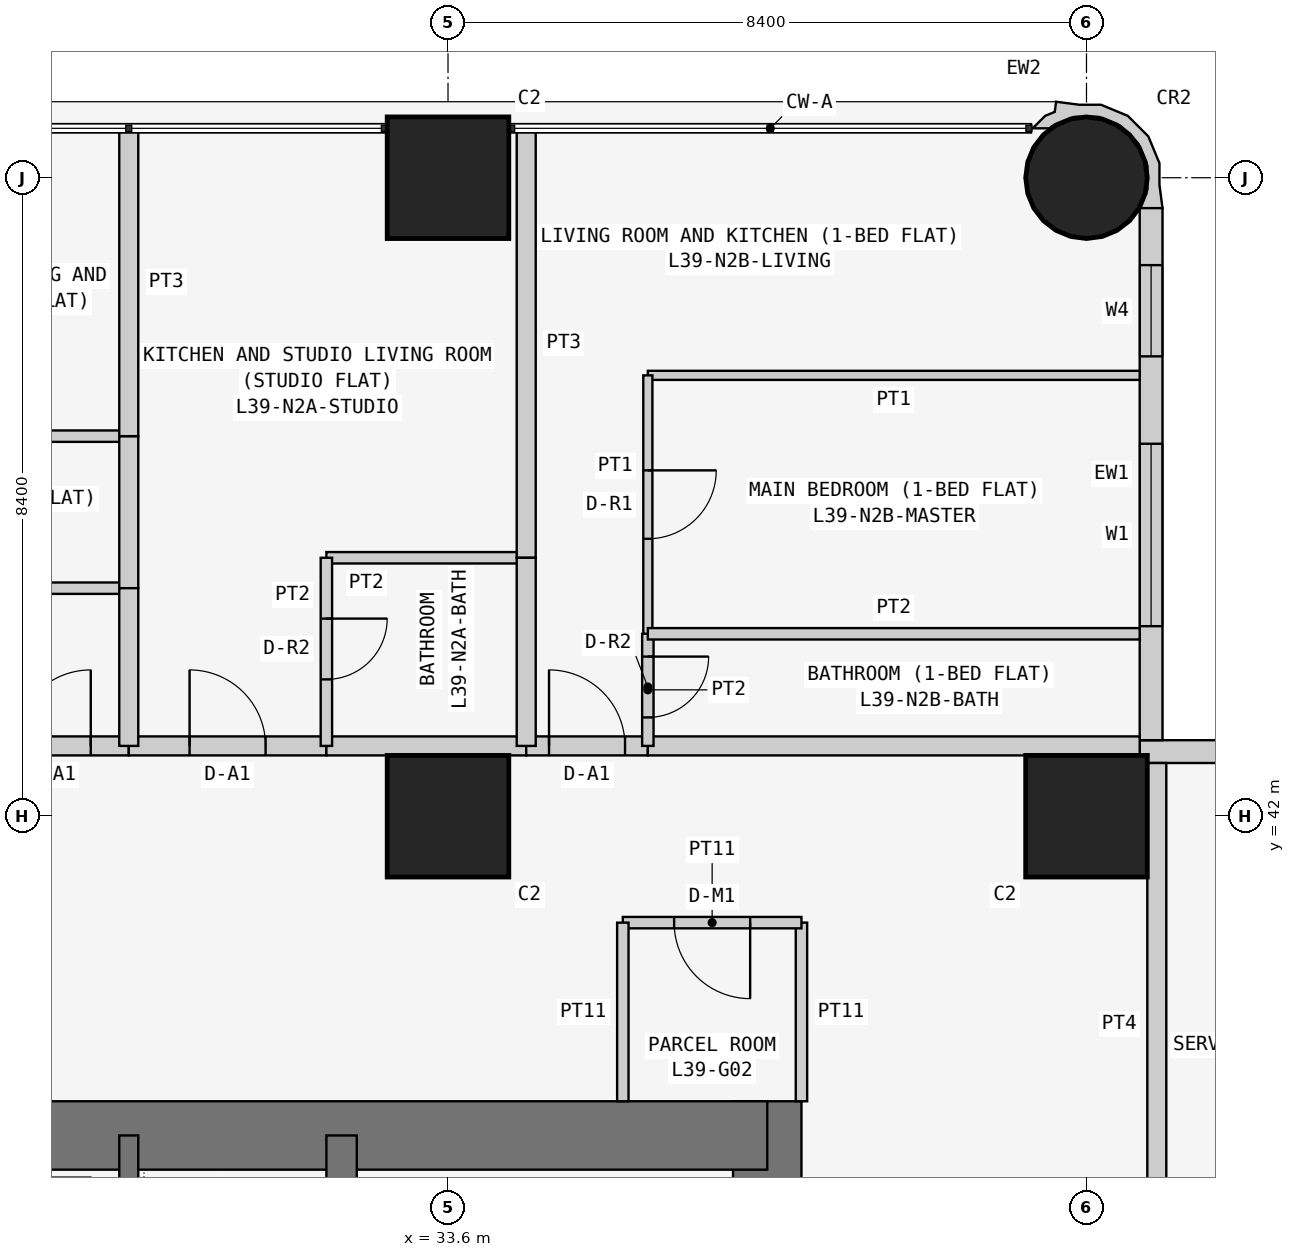
"""IFC4 building model, lengths in metres.
Left out: names, types, materials, properties, quantities, classifications, styles, units other than length and angle.
Written with IfcOpenShell. Run it as: python <this file> out.ifc"""

import sys

from ifc_helpers import new_model, si_unit, direction, frame, frame_2d, origin, origin_2d, place, context, subcontext, project, spatial, polyline, rectangle, circle, outline, extrude, element, fill, save


model = new_model("IFC4")
c1 = context("Model", 3, precision=1e-05, world=origin(), true_north=direction((0.0, 1.0)))
c2 = subcontext(c1, "Body", "Model", "MODEL_VIEW")
j1 = project(units=[si_unit("LENGTHUNIT", "METRE"), si_unit("PLANEANGLEUNIT", "RADIAN")], contexts=[c1])
p1 = place(None, origin())
s1 = spatial("IfcSite", under=j1, at=p1, CompositionType="ELEMENT")
p2 = place(p1, origin())
s2 = spatial("IfcBuilding", under=s1, at=p2, CompositionType="ELEMENT")
p3 = place(p2, frame((0.0, 0.0, 152.1)))
s3 = spatial("IfcBuildingStorey", under=s2, at=p3, CompositionType="ELEMENT", Elevation=152.1)
for number, where, z_axis, x_axis in (
    (1, (33.6, 42.0, 0.0), (0.0, 0.0, 1.0), (1.0, 0.0, 0.0)),
    (2, (33.6, 50.4, 0.0), (0.0, 0.0, 1.0), (1.0, 0.0, 0.0)),
    (3, (42.0, 42.0, 0.0), (0.0, 0.0, 1.0), (1.0, 0.0, 0.0)),
):
    element("IfcColumn", number, at=place(p3, frame(where, z_axis=z_axis, x_axis=x_axis)), inside=s3, PredefinedType="COLUMN", context=c2, shape_type="SweptSolid", body=[
        extrude(rectangle(XDim=1.6, YDim=1.6, at=origin_2d()), origin(), (0.0, 0.0, 1.0), 3.6),
    ])
p4 = place(p3, frame((42.0, 50.4, 0.0), z_axis=(0.0, 0.0, 1.0), x_axis=(1.0, 0.0, 0.0)))
e4 = element("IfcColumn", 4, at=p4, inside=s3, PredefinedType="COLUMN", context=c2, shape_type="SweptSolid", body=[
    extrude(circle(Radius=0.8, at=origin_2d()), origin(), (0.0, 0.0, 1.0), 3.6),
])
p5 = place(p3, frame((37.8, 21.0, 0.0), z_axis=(0.0, 0.0, 1.0), x_axis=(0.0, 1.0, 0.0)))
e5 = element("IfcWall", 5, at=p5, inside=s3, PredefinedType="SHEAR", context=c2, shape_type="SweptSolid", body=[
    extrude(rectangle(XDim=17.25, YDim=0.9, at=frame_2d((8.625, 0.0))), origin(), (0.0, 0.0, 1.0), 3.6),
])
p6 = place(p5, frame((5.2, 0.0, 0.0)))
e6 = element("IfcOpeningElement", 6, at=p6, cuts=e5, PredefinedType="OPENING", context=c2, shape_type="SweptSolid", body=[
    extrude(rectangle(XDim=1.2, YDim=2.1, at=frame_2d((0.6, 1.05))), frame((0.0, 0.46, 0.0), z_axis=(0.0, -1.0, 0.0), x_axis=(1.0, 0.0, 0.0)), (0.0, 0.0, 1.0), 0.92),
])
p7 = place(p3, frame((37.8, 37.8, 0.0), z_axis=(0.0, 0.0, 1.0), x_axis=(-1.0, 0.0, 0.0)))
e7 = element("IfcWall", 7, at=p7, inside=s3, PredefinedType="SHEAR", context=c2, shape_type="SweptSolid", body=[
    extrude(rectangle(XDim=17.25, YDim=0.9, at=frame_2d((8.625, 0.0))), origin(), (0.0, 0.0, 1.0), 3.6),
])
p8 = place(p3, frame((32.2, 29.2, 0.0), z_axis=(0.0, 0.0, 1.0), x_axis=(0.0, 1.0, 0.0)))
e8 = element("IfcWall", 8, at=p8, inside=s3, PredefinedType="SHEAR", context=c2, shape_type="SweptSolid", body=[
    extrude(rectangle(XDim=8.6, YDim=0.4, at=frame_2d((4.3, 0.0))), origin(), (0.0, 0.0, 1.0), 3.6),
])
p9 = place(p3, frame((29.4, 34.6, 0.0), z_axis=(0.0, 0.0, 1.0), x_axis=(0.0, 1.0, 0.0)))
e9 = element("IfcWall", 9, at=p9, inside=s3, PredefinedType="SHEAR", context=c2, shape_type="SweptSolid", body=[
    extrude(rectangle(XDim=3.2, YDim=0.25, at=frame_2d((1.6, 0.0))), origin(), (0.0, 0.0, 1.0), 3.6),
])
p10 = place(p3, frame((58.4, 42.85, 0.0), z_axis=(0.0, 0.0, 1.0), x_axis=(-1.0, 0.0, 0.0)))
e10 = element("IfcWall", 10, at=p10, inside=s3, PredefinedType="SOLIDWALL", context=c2, shape_type="SweptSolid", body=[
    extrude(rectangle(XDim=15.7, YDim=0.3, at=frame_2d((7.85, 0.0))), origin(), (0.0, 0.0, 1.0), 3.45),
])
p11 = place(p10, frame((12.4, 0.0, 0.9)))
e11 = element("IfcOpeningElement", 11, at=p11, cuts=e10, PredefinedType="OPENING", context=c2, shape_type="SweptSolid", body=[
    extrude(rectangle(XDim=1.8, YDim=1.5, at=frame_2d((0.9, 0.75))), frame((0.0, 0.16, 0.0), z_axis=(0.0, -1.0, 0.0), x_axis=(1.0, 0.0, 0.0)), (0.0, 0.0, 1.0), 0.32),
])
p12 = place(p10, frame((9.55, 0.0, 1.5)))
e12 = element("IfcOpeningElement", 12, at=p12, cuts=e10, PredefinedType="OPENING", context=c2, shape_type="SweptSolid", body=[
    extrude(rectangle(XDim=0.9, YDim=0.7, at=frame_2d((0.45, 0.35))), frame((0.0, 0.16, 0.0), z_axis=(0.0, -1.0, 0.0), x_axis=(1.0, 0.0, 0.0)), (0.0, 0.0, 1.0), 0.32),
])
p13 = place(p10, frame((5.1, 0.0, 0.9)))
e13 = element("IfcOpeningElement", 13, at=p13, cuts=e10, PredefinedType="OPENING", context=c2, shape_type="SweptSolid", body=[
    extrude(rectangle(XDim=1.8, YDim=1.5, at=frame_2d((0.9, 0.75))), frame((0.0, 0.16, 0.0), z_axis=(0.0, -1.0, 0.0), x_axis=(1.0, 0.0, 0.0)), (0.0, 0.0, 1.0), 0.32),
])
p14 = place(p10, frame((2.0, 0.0, 0.0)))
e14 = element("IfcOpeningElement", 14, at=p14, cuts=e10, PredefinedType="OPENING", context=c2, shape_type="SweptSolid", body=[
    extrude(rectangle(XDim=0.9, YDim=2.4, at=frame_2d((0.45, 1.2))), frame((0.0, 0.16, 0.0), z_axis=(0.0, -1.0, 0.0), x_axis=(1.0, 0.0, 0.0)), (0.0, 0.0, 1.0), 0.32),
])
p15 = place(p10, frame((0.7, 0.0, 0.9)))
e15 = element("IfcOpeningElement", 15, at=p15, cuts=e10, PredefinedType="OPENING", context=c2, shape_type="SweptSolid", body=[
    extrude(rectangle(XDim=1.2, YDim=1.5, at=frame_2d((0.6, 0.75))), frame((0.0, 0.16, 0.0), z_axis=(0.0, -1.0, 0.0), x_axis=(1.0, 0.0, 0.0)), (0.0, 0.0, 1.0), 0.32),
])
p16 = place(p3, frame((42.85, 43.0, 0.0), z_axis=(0.0, 0.0, 1.0), x_axis=(0.0, 1.0, 0.0)))
e16 = element("IfcWall", 16, at=p16, inside=s3, PredefinedType="SOLIDWALL", context=c2, shape_type="SweptSolid", body=[
    extrude(rectangle(XDim=7.0, YDim=0.3, at=frame_2d((3.5, 0.0))), origin(), (0.0, 0.0, 1.0), 3.45),
])
p17 = place(p16, frame((1.5, 0.0, 0.9)))
e17 = element("IfcOpeningElement", 17, at=p17, cuts=e16, PredefinedType="OPENING", context=c2, shape_type="SweptSolid", body=[
    extrude(rectangle(XDim=2.4, YDim=1.5, at=frame_2d((1.2, 0.75))), frame((0.0, 0.16, 0.0), z_axis=(0.0, -1.0, 0.0), x_axis=(1.0, 0.0, 0.0)), (0.0, 0.0, 1.0), 0.32),
])
p18 = place(p16, frame((5.05, 0.0, 0.9)))
e18 = element("IfcOpeningElement", 18, at=p18, cuts=e16, PredefinedType="OPENING", context=c2, shape_type="SweptSolid", body=[
    extrude(rectangle(XDim=1.2, YDim=1.5, at=frame_2d((0.6, 0.75))), frame((0.0, 0.16, 0.0), z_axis=(0.0, -1.0, 0.0), x_axis=(1.0, 0.0, 0.0)), (0.0, 0.0, 1.0), 0.32),
])
p19 = place(p3, frame((42.817, 50.073, 0.0), z_axis=(0.0, 0.0, 1.0), x_axis=(0.343276641956, 0.93923434088, 0.0)))
e19 = element("IfcWall", 19, at=p19, inside=s3, PredefinedType="SOLIDWALL", context=c2, shape_type="SweptSolid", body=[
    extrude(outline(polyline([(0.266, -0.055), (0.535, 0.044), (0.817, 0.302), (0.978, 0.648), (0.994, 1.03), (0.895, 1.3), (0.828, 1.598), (0.697, 1.569), (0.604, 1.67), (0.394, 1.767), (0.471, 1.556), (0.509, 1.539), (0.724, 1.304), (0.833, 1.005), (0.82, 0.687), (0.686, 0.397), (0.451, 0.182), (0.152, 0.073), (-0.116, 0.084), (-0.128, 0.078), (-0.146, 0.071), (-0.006, -0.197), (0.266, -0.055)])), origin(), (0.0, 0.0, 1.0), 3.45),
])
p20 = place(p3, frame((38.25, 38.25, 0.0), z_axis=(0.0, 0.0, 1.0), x_axis=(0.0, 1.0, 0.0)))
e20 = element("IfcWall", 20, at=p20, inside=s3, PredefinedType="PARTITIONING", context=c2, shape_type="SweptSolid", body=[
    extrude(rectangle(XDim=2.35, YDim=0.15, at=frame_2d((1.175, 0.0))), origin(), (0.0, 0.0, 1.0), 3.45),
])
p21 = place(p3, frame((38.25, 40.6, 0.0), z_axis=(0.0, 0.0, 1.0), x_axis=(-1.0, 0.0, 0.0)))
e21 = element("IfcWall", 21, at=p21, inside=s3, PredefinedType="PARTITIONING", context=c2, shape_type="SweptSolid", body=[
    extrude(rectangle(XDim=2.35, YDim=0.15, at=frame_2d((1.175, 0.0))), origin(), (0.0, 0.0, 1.0), 3.45),
])
p22 = place(p21, frame((0.675, 0.0, 0.0)))
e22 = element("IfcOpeningElement", 22, at=p22, cuts=e21, PredefinedType="OPENING", context=c2, shape_type="SweptSolid", body=[
    extrude(rectangle(XDim=1.0, YDim=2.1, at=frame_2d((0.5, 1.05))), frame((0.0, 0.085, 0.0), z_axis=(0.0, -1.0, 0.0), x_axis=(1.0, 0.0, 0.0)), (0.0, 0.0, 1.0), 0.17),
])
p23 = place(p3, frame((35.9, 40.6, 0.0), z_axis=(0.0, 0.0, 1.0), x_axis=(0.0, -1.0, 0.0)))
e23 = element("IfcWall", 23, at=p23, inside=s3, PredefinedType="PARTITIONING", context=c2, shape_type="SweptSolid", body=[
    extrude(rectangle(XDim=2.35, YDim=0.15, at=frame_2d((1.175, 0.0))), origin(), (0.0, 0.0, 1.0), 3.45),
])
p24 = place(p3, frame((22.971, 42.925, 0.0), z_axis=(0.0, 0.0, 1.0), x_axis=(1.0, 0.0, 0.0)))
e24 = element("IfcWall", 24, at=p24, inside=s3, PredefinedType="PARTITIONING", context=c2, shape_type="SweptSolid", body=[
    extrude(rectangle(XDim=6.429, YDim=0.25, at=frame_2d((3.214, 0.0))), origin(), (0.0, 0.0, 1.0), 3.45),
])
p25 = place(p24, frame((4.929, 0.0, 0.0)))
e25 = element("IfcOpeningElement", 25, at=p25, cuts=e24, PredefinedType="OPENING", context=c2, shape_type="SweptSolid", body=[
    extrude(rectangle(XDim=1.0, YDim=2.1, at=frame_2d((0.5, 1.05))), frame((0.0, 0.135, 0.0), z_axis=(0.0, -1.0, 0.0), x_axis=(1.0, 0.0, 0.0)), (0.0, 0.0, 1.0), 0.27),
])
p26 = place(p3, frame((29.4, 42.925, 0.0), z_axis=(0.0, 0.0, 1.0), x_axis=(1.0, 0.0, 0.0)))
e26 = element("IfcWall", 26, at=p26, inside=s3, PredefinedType="PARTITIONING", context=c2, shape_type="SweptSolid", body=[
    extrude(rectangle(XDim=2.6, YDim=0.25, at=frame_2d((1.3, 0.0))), origin(), (0.0, 0.0, 1.0), 3.45),
])
p27 = place(p26, frame((0.8, 0.0, 0.0)))
e27 = element("IfcOpeningElement", 27, at=p27, cuts=e26, PredefinedType="OPENING", context=c2, shape_type="SweptSolid", body=[
    extrude(rectangle(XDim=1.0, YDim=2.1, at=frame_2d((0.5, 1.05))), frame((0.0, 0.135, 0.0), z_axis=(0.0, -1.0, 0.0), x_axis=(1.0, 0.0, 0.0)), (0.0, 0.0, 1.0), 0.27),
])
p28 = place(p3, frame((32.0, 42.925, 0.0), z_axis=(0.0, 0.0, 1.0), x_axis=(1.0, 0.0, 0.0)))
e28 = element("IfcWall", 28, at=p28, inside=s3, PredefinedType="PARTITIONING", context=c2, shape_type="SweptSolid", body=[
    extrude(rectangle(XDim=2.629, YDim=0.25, at=frame_2d((1.314, 0.0))), origin(), (0.0, 0.0, 1.0), 3.45),
])
p29 = place(p3, frame((34.629, 42.925, 0.0), z_axis=(0.0, 0.0, 1.0), x_axis=(1.0, 0.0, 0.0)))
e29 = element("IfcWall", 29, at=p29, inside=s3, PredefinedType="PARTITIONING", context=c2, shape_type="SweptSolid", body=[
    extrude(rectangle(XDim=1.6, YDim=0.25, at=frame_2d((0.8, 0.0))), origin(), (0.0, 0.0, 1.0), 3.45),
])
p30 = place(p29, frame((0.3, 0.0, 0.0)))
e30 = element("IfcOpeningElement", 30, at=p30, cuts=e29, PredefinedType="OPENING", context=c2, shape_type="SweptSolid", body=[
    extrude(rectangle(XDim=1.0, YDim=2.1, at=frame_2d((0.5, 1.05))), frame((0.0, 0.135, 0.0), z_axis=(0.0, -1.0, 0.0), x_axis=(1.0, 0.0, 0.0)), (0.0, 0.0, 1.0), 0.27),
])
p31 = place(p3, frame((36.229, 42.925, 0.0), z_axis=(0.0, 0.0, 1.0), x_axis=(1.0, 0.0, 0.0)))
e31 = element("IfcWall", 31, at=p31, inside=s3, PredefinedType="PARTITIONING", context=c2, shape_type="SweptSolid", body=[
    extrude(rectangle(XDim=6.471, YDim=0.25, at=frame_2d((3.235, 0.0))), origin(), (0.0, 0.0, 1.0), 3.45),
])
p32 = place(p3, frame((42.925, 42.7, 0.0), z_axis=(0.0, 0.0, 1.0), x_axis=(0.0, -1.0, 0.0)))
e32 = element("IfcWall", 32, at=p32, inside=s3, PredefinedType="PARTITIONING", context=c2, shape_type="SweptSolid", body=[
    extrude(rectangle(XDim=6.871, YDim=0.25, at=frame_2d((3.436, 0.0))), origin(), (0.0, 0.0, 1.0), 3.45),
])
for number, where, z_axis, x_axis in (
    (33, (29.4, 47.0, 0.0), (0.0, 0.0, 1.0), (-1.0, 0.0, 0.0)),
    (34, (24.171, 45.0, 0.0), (0.0, 0.0, 1.0), (1.0, 0.0, 0.0)),
):
    element("IfcWall", number, at=place(p3, frame(where, z_axis=z_axis, x_axis=x_axis)), inside=s3, PredefinedType="PARTITIONING", context=c2, shape_type="SweptSolid", body=[
        extrude(rectangle(XDim=5.229, YDim=0.15, at=frame_2d((2.615, 0.0))), origin(), (0.0, 0.0, 1.0), 3.45),
    ])
p33 = place(p3, frame((29.4, 45.0, 0.0), z_axis=(0.0, 0.0, 1.0), x_axis=(0.0, 1.0, 0.0)))
e35 = element("IfcWall", 35, at=p33, inside=s3, PredefinedType="PARTITIONING", context=c2, shape_type="SweptSolid", body=[
    extrude(rectangle(XDim=2.0, YDim=0.25, at=frame_2d((1.0, 0.0))), origin(), (0.0, 0.0, 1.0), 2.848),
])
p34 = place(p3, frame((29.4, 45.0, 0.0), z_axis=(0.0, 0.0, 1.0), x_axis=(0.0, -1.0, 0.0)))
e36 = element("IfcWall", 36, at=p34, inside=s3, PredefinedType="PARTITIONING", context=c2, shape_type="SweptSolid", body=[
    extrude(rectangle(XDim=2.075, YDim=0.25, at=frame_2d((1.038, 0.0))), origin(), (0.0, 0.0, 1.0), 2.848),
])
p35 = place(p3, frame((29.4, 51.05, 0.0), z_axis=(0.0, 0.0, 1.0), x_axis=(0.0, -1.0, 0.0)))
e37 = element("IfcWall", 37, at=p35, inside=s3, PredefinedType="PARTITIONING", context=c2, shape_type="SweptSolid", body=[
    extrude(rectangle(XDim=4.05, YDim=0.25, at=frame_2d((2.025, 0.0))), origin(), (0.0, 0.0, 1.0), 2.848),
])
p36 = place(p3, frame((34.629, 45.4, 0.0), z_axis=(0.0, 0.0, 1.0), x_axis=(-1.0, 0.0, 0.0)))
e38 = element("IfcWall", 38, at=p36, inside=s3, PredefinedType="PARTITIONING", context=c2, shape_type="SweptSolid", body=[
    extrude(rectangle(XDim=2.629, YDim=0.15, at=frame_2d((1.314, 0.0))), origin(), (0.0, 0.0, 1.0), 3.45),
])
p37 = place(p3, frame((32.0, 45.4, 0.0), z_axis=(0.0, 0.0, 1.0), x_axis=(0.0, -1.0, 0.0)))
e39 = element("IfcWall", 39, at=p37, inside=s3, PredefinedType="PARTITIONING", context=c2, shape_type="SweptSolid", body=[
    extrude(rectangle(XDim=2.475, YDim=0.15, at=frame_2d((1.237, 0.0))), origin(), (0.0, 0.0, 1.0), 3.45),
])
p38 = place(p37, frame((0.8, 0.0, 0.0)))
e40 = element("IfcOpeningElement", 40, at=p38, cuts=e39, PredefinedType="OPENING", context=c2, shape_type="SweptSolid", body=[
    extrude(rectangle(XDim=0.8, YDim=2.1, at=frame_2d((0.4, 1.05))), frame((0.0, 0.085, 0.0), z_axis=(0.0, -1.0, 0.0), x_axis=(1.0, 0.0, 0.0)), (0.0, 0.0, 1.0), 0.17),
])
p39 = place(p3, frame((34.629, 51.05, 0.0), z_axis=(0.0, 0.0, 1.0), x_axis=(0.0, -1.0, 0.0)))
e41 = element("IfcWall", 41, at=p39, inside=s3, PredefinedType="PARTITIONING", context=c2, shape_type="SweptSolid", body=[
    extrude(rectangle(XDim=5.65, YDim=0.25, at=frame_2d((2.825, 0.0))), origin(), (0.0, 0.0, 1.0), 3.45),
])
p40 = place(p3, frame((34.629, 45.4, 0.0), z_axis=(0.0, 0.0, 1.0), x_axis=(0.0, -1.0, 0.0)))
e42 = element("IfcWall", 42, at=p40, inside=s3, PredefinedType="PARTITIONING", context=c2, shape_type="SweptSolid", body=[
    extrude(rectangle(XDim=2.475, YDim=0.25, at=frame_2d((1.237, 0.0))), origin(), (0.0, 0.0, 1.0), 3.45),
])
p41 = place(p3, frame((36.229, 44.4, 0.0), z_axis=(0.0, 0.0, 1.0), x_axis=(0.0, -1.0, 0.0)))
e43 = element("IfcWall", 43, at=p41, inside=s3, PredefinedType="PARTITIONING", context=c2, shape_type="SweptSolid", body=[
    extrude(rectangle(XDim=1.475, YDim=0.15, at=frame_2d((0.737, 0.0))), origin(), (0.0, 0.0, 1.0), 3.45),
])
p42 = place(p41, frame((0.3, 0.0, 0.0)))
e44 = element("IfcOpeningElement", 44, at=p42, cuts=e43, PredefinedType="OPENING", context=c2, shape_type="SweptSolid", body=[
    extrude(rectangle(XDim=0.8, YDim=2.1, at=frame_2d((0.4, 1.05))), frame((0.0, 0.085, 0.0), z_axis=(0.0, -1.0, 0.0), x_axis=(1.0, 0.0, 0.0)), (0.0, 0.0, 1.0), 0.17),
])
p43 = place(p3, frame((42.7, 47.8, 0.0), z_axis=(0.0, 0.0, 1.0), x_axis=(-1.0, 0.0, 0.0)))
e45 = element("IfcWall", 45, at=p43, inside=s3, PredefinedType="PARTITIONING", context=c2, shape_type="SweptSolid", body=[
    extrude(rectangle(XDim=6.471, YDim=0.12, at=frame_2d((3.235, 0.0))), origin(), (0.0, 0.0, 1.0), 3.45),
])
p44 = place(p3, frame((36.229, 47.8, 0.0), z_axis=(0.0, 0.0, 1.0), x_axis=(0.0, -1.0, 0.0)))
e46 = element("IfcWall", 46, at=p44, inside=s3, PredefinedType="PARTITIONING", context=c2, shape_type="SweptSolid", body=[
    extrude(rectangle(XDim=3.4, YDim=0.12, at=frame_2d((1.7, 0.0))), origin(), (0.0, 0.0, 1.0), 3.45),
])
p45 = place(p44, frame((1.25, 0.0, 0.0)))
e47 = element("IfcOpeningElement", 47, at=p45, cuts=e46, PredefinedType="OPENING", context=c2, shape_type="SweptSolid", body=[
    extrude(rectangle(XDim=0.9, YDim=2.1, at=frame_2d((0.45, 1.05))), frame((0.0, 0.07, 0.0), z_axis=(0.0, -1.0, 0.0), x_axis=(1.0, 0.0, 0.0)), (0.0, 0.0, 1.0), 0.14),
])
p46 = place(p3, frame((36.229, 44.4, 0.0), z_axis=(0.0, 0.0, 1.0), x_axis=(1.0, 0.0, 0.0)))
e48 = element("IfcWall", 48, at=p46, inside=s3, PredefinedType="PARTITIONING", context=c2, shape_type="SweptSolid", body=[
    extrude(rectangle(XDim=6.471, YDim=0.15, at=frame_2d((3.235, 0.0))), origin(), (0.0, 0.0, 1.0), 3.45),
])
p47 = place(p17, origin())
e49 = element("IfcWindow", 49, at=p47, inside=s3, PartitioningType="SINGLE_PANEL", PredefinedType="WINDOW", context=c2, shape_type="SweptSolid", body=[
    extrude(rectangle(XDim=2.4, YDim=1.5, at=frame_2d((1.2, 0.75))), frame((0.0, 0.03, 0.0), z_axis=(0.0, -1.0, 0.0), x_axis=(1.0, 0.0, 0.0)), (0.0, 0.0, 1.0), 0.06),
])
fill(e17, e49)
p48 = place(p18, origin())
e50 = element("IfcWindow", 50, at=p48, inside=s3, PartitioningType="SINGLE_PANEL", PredefinedType="WINDOW", context=c2, shape_type="SweptSolid", body=[
    extrude(rectangle(XDim=1.2, YDim=1.5, at=frame_2d((0.6, 0.75))), frame((0.0, 0.03, 0.0), z_axis=(0.0, -1.0, 0.0), x_axis=(1.0, 0.0, 0.0)), (0.0, 0.0, 1.0), 0.06),
])
fill(e18, e50)
p49 = place(p22, origin())
e51 = element("IfcDoor", 51, at=p49, inside=s3, OperationType="SINGLE_SWING_LEFT", PredefinedType="DOOR", context=c2, shape_type="SweptSolid", body=[
    extrude(rectangle(XDim=1.0, YDim=2.1, at=frame_2d((0.5, 1.05))), frame((0.0, 0.025, 0.0), z_axis=(0.0, -1.0, 0.0), x_axis=(1.0, 0.0, 0.0)), (0.0, 0.0, 1.0), 0.05),
])
fill(e22, e51)
p50 = place(p25, origin())
e52 = element("IfcDoor", 52, at=p50, inside=s3, OperationType="SINGLE_SWING_RIGHT", PredefinedType="DOOR", context=c2, shape_type="SweptSolid", body=[
    extrude(rectangle(XDim=1.0, YDim=2.1, at=frame_2d((0.5, 1.05))), frame((0.0, 0.025, 0.0), z_axis=(0.0, -1.0, 0.0), x_axis=(1.0, 0.0, 0.0)), (0.0, 0.0, 1.0), 0.05),
])
fill(e25, e52)
p51 = place(p27, origin())
e53 = element("IfcDoor", 53, at=p51, inside=s3, OperationType="SINGLE_SWING_LEFT", PredefinedType="DOOR", context=c2, shape_type="SweptSolid", body=[
    extrude(rectangle(XDim=1.0, YDim=2.1, at=frame_2d((0.5, 1.05))), frame((0.0, 0.025, 0.0), z_axis=(0.0, -1.0, 0.0), x_axis=(1.0, 0.0, 0.0)), (0.0, 0.0, 1.0), 0.05),
])
fill(e27, e53)
p52 = place(p38, origin())
e54 = element("IfcDoor", 54, at=p52, inside=s3, OperationType="SINGLE_SWING_LEFT", PredefinedType="DOOR", context=c2, shape_type="SweptSolid", body=[
    extrude(rectangle(XDim=0.8, YDim=2.1, at=frame_2d((0.4, 1.05))), frame((0.0, 0.025, 0.0), z_axis=(0.0, -1.0, 0.0), x_axis=(1.0, 0.0, 0.0)), (0.0, 0.0, 1.0), 0.05),
])
fill(e40, e54)
p53 = place(p30, origin())
e55 = element("IfcDoor", 55, at=p53, inside=s3, OperationType="SINGLE_SWING_LEFT", PredefinedType="DOOR", context=c2, shape_type="SweptSolid", body=[
    extrude(rectangle(XDim=1.0, YDim=2.1, at=frame_2d((0.5, 1.05))), frame((0.0, 0.025, 0.0), z_axis=(0.0, -1.0, 0.0), x_axis=(1.0, 0.0, 0.0)), (0.0, 0.0, 1.0), 0.05),
])
fill(e30, e55)
p54 = place(p42, origin())
e56 = element("IfcDoor", 56, at=p54, inside=s3, OperationType="SINGLE_SWING_LEFT", PredefinedType="DOOR", context=c2, shape_type="SweptSolid", body=[
    extrude(rectangle(XDim=0.8, YDim=2.1, at=frame_2d((0.4, 1.05))), frame((0.0, 0.025, 0.0), z_axis=(0.0, -1.0, 0.0), x_axis=(1.0, 0.0, 0.0)), (0.0, 0.0, 1.0), 0.05),
])
fill(e44, e56)
p55 = place(p45, origin())
e57 = element("IfcDoor", 57, at=p55, inside=s3, OperationType="SINGLE_SWING_LEFT", PredefinedType="DOOR", context=c2, shape_type="SweptSolid", body=[
    extrude(rectangle(XDim=0.9, YDim=2.1, at=frame_2d((0.45, 1.05))), frame((0.0, 0.025, 0.0), z_axis=(0.0, -1.0, 0.0), x_axis=(1.0, 0.0, 0.0)), (0.0, 0.0, 1.0), 0.05),
])
fill(e47, e57)
save(model, sys.argv[1])
